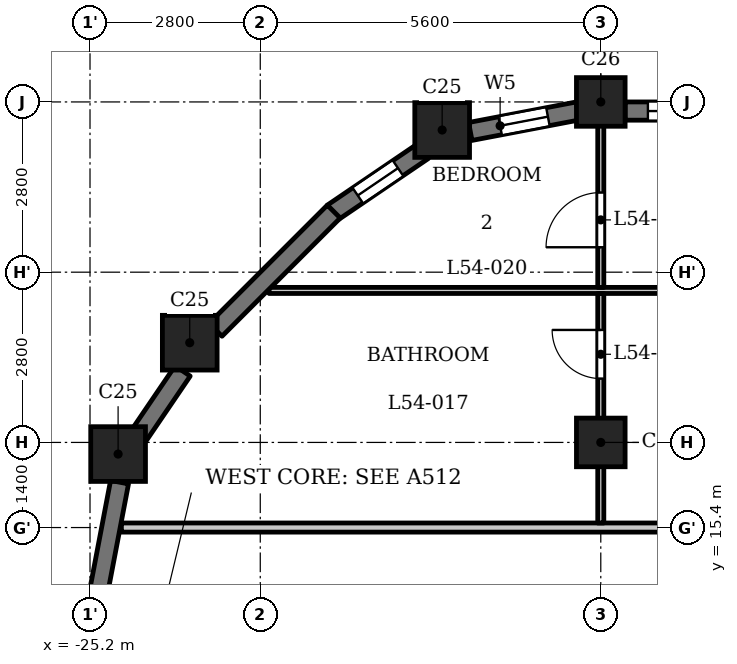
"""IFC4 building model, lengths in metres.
Left out: names, types, materials, properties, quantities, classifications, styles, units other than length and angle.
Written with IfcOpenShell. Run it as: python <this file> out.ifc"""

import sys

from ifc_helpers import new_model, si_unit, direction, frame, frame_2d, origin, origin_2d, place, context, subcontext, project, spatial, rectangle, extrude, element, fill, save


model = new_model("IFC4")
c1 = context("Model", 3, precision=1e-05, world=origin(), true_north=direction((0.0, 1.0)))
c2 = subcontext(c1, "Body", "Model", "MODEL_VIEW")
j1 = project(units=[si_unit("LENGTHUNIT", "METRE"), si_unit("PLANEANGLEUNIT", "RADIAN")], contexts=[c1])
p1 = place(None, origin())
s1 = spatial("IfcSite", under=j1, at=p1, CompositionType="ELEMENT")
p2 = place(p1, origin())
s2 = spatial("IfcBuilding", under=s1, at=p2, CompositionType="ELEMENT")
p3 = place(p2, frame((0.0, 0.0, 209.9)))
s3 = spatial("IfcBuildingStorey", under=s2, at=p3, CompositionType="ELEMENT", Elevation=209.9)
for number, where, z_axis, x_axis in (
    (1, (-19.409, 21.938, 0.0), (0.0, 0.0, 1.0), (1.0, 0.0, 0.0)),
    (2, (-23.56, 18.44, 0.0), (0.0, 0.0, 1.0), (1.0, 0.0, 0.0)),
    (3, (-24.738, 16.609, 0.0), (0.0, 0.0, 1.0), (1.0, 0.0, 0.0)),
):
    element("IfcColumn", number, at=place(p3, frame(where, z_axis=z_axis, x_axis=x_axis)), inside=s3, PredefinedType="COLUMN", context=c2, shape_type="SweptSolid", body=[
        extrude(rectangle(XDim=0.9, YDim=0.9, at=origin_2d()), origin(), (0.0, 0.0, 1.0), 3.5),
    ])
for number, where, z_axis, x_axis in (
    (4, (-16.8, 16.8, 0.0), (0.0, 0.0, 1.0), (1.0, 0.0, 0.0)),
    (5, (-16.8, 22.4, 0.0), (0.0, 0.0, 1.0), (1.0, 0.0, 0.0)),
):
    element("IfcColumn", number, at=place(p3, frame(where, z_axis=z_axis, x_axis=x_axis)), inside=s3, PredefinedType="COLUMN", context=c2, shape_type="SweptSolid", body=[
        extrude(rectangle(XDim=0.8, YDim=0.8, at=origin_2d()), origin(), (0.0, 0.0, 1.0), 3.5),
    ])
p4 = place(p3, frame((-14.45, 22.25, 0.0), z_axis=(0.0, 0.0, 1.0), x_axis=(-1.0, 0.0, 0.0)))
e6 = element("IfcWall", 6, at=p4, inside=s3, PredefinedType="SOLIDWALL", context=c2, shape_type="SweptSolid", body=[
    extrude(rectangle(XDim=1.95, YDim=0.3, at=frame_2d((0.975, 0.0))), origin(), (0.0, 0.0, 1.0), 2.5),
])
p5 = place(p4, frame((0.375, 0.0, 0.6)))
e7 = element("IfcOpeningElement", 7, at=p5, cuts=e6, PredefinedType="OPENING", context=c2, shape_type="SweptSolid", body=[
    extrude(rectangle(XDim=1.2, YDim=1.55, at=frame_2d((0.6, 0.775))), frame((0.0, 0.16, 0.0), z_axis=(0.0, -1.0, 0.0), x_axis=(1.0, 0.0, 0.0)), (0.0, 0.0, 1.0), 0.32),
])
p6 = place(p3, frame((-17.179, 22.251, 0.0), z_axis=(0.0, 0.0, 1.0), x_axis=(-0.98230529033, -0.187286722942, 0.0)))
e8 = element("IfcWall", 8, at=p6, inside=s3, PredefinedType="SOLIDWALL", context=c2, shape_type="SweptSolid", body=[
    extrude(rectangle(XDim=1.799, YDim=0.3, at=frame_2d((0.899, 0.0))), origin(), (0.0, 0.0, 1.0), 2.5),
])
p7 = place(p6, frame((0.5, 0.0, 0.6)))
e9 = element("IfcOpeningElement", 9, at=p7, cuts=e8, PredefinedType="OPENING", context=c2, shape_type="SweptSolid", body=[
    extrude(rectangle(XDim=0.8, YDim=1.55, at=frame_2d((0.4, 0.775))), frame((0.0, 0.16, 0.0), z_axis=(0.0, -1.0, 0.0), x_axis=(1.0, 0.0, 0.0)), (0.0, 0.0, 1.0), 0.32),
])
p8 = place(p3, frame((-19.719, 21.594, 0.0), z_axis=(0.0, 0.0, 1.0), x_axis=(-0.827067282455, -0.562102935673, 0.0)))
e10 = element("IfcWall", 10, at=p8, inside=s3, PredefinedType="SOLIDWALL", context=c2, shape_type="SweptSolid", body=[
    extrude(rectangle(XDim=1.806, YDim=0.3, at=frame_2d((0.903, 0.0))), origin(), (0.0, 0.0, 1.0), 2.5),
])
p9 = place(p8, frame((0.503, 0.0, 0.6)))
e11 = element("IfcOpeningElement", 11, at=p9, cuts=e10, PredefinedType="OPENING", context=c2, shape_type="SweptSolid", body=[
    extrude(rectangle(XDim=0.8, YDim=1.55, at=frame_2d((0.4, 0.775))), frame((0.0, 0.16, 0.0), z_axis=(0.0, -1.0, 0.0), x_axis=(1.0, 0.0, 0.0)), (0.0, 0.0, 1.0), 0.32),
])
p10 = place(p3, frame((-21.191, 20.597, 0.0), z_axis=(0.0, 0.0, 1.0), x_axis=(-0.707106781187, -0.707106781187, 0.0)))
e12 = element("IfcWall", 12, at=p10, inside=s3, PredefinedType="SOLIDWALL", context=c2, shape_type="SweptSolid", body=[
    extrude(rectangle(XDim=2.75, YDim=0.3, at=frame_2d((1.375, 0.0))), origin(), (0.0, 0.0, 1.0), 2.5),
])
p11 = place(p3, frame((-23.676, 17.975, 0.0), z_axis=(0.0, 0.0, 1.0), x_axis=(-0.56200149592, -0.827136215253, 0.0)))
e13 = element("IfcWall", 13, at=p11, inside=s3, PredefinedType="SOLIDWALL", context=c2, shape_type="SweptSolid", body=[
    extrude(rectangle(XDim=1.277, YDim=0.3, at=frame_2d((0.639, 0.0))), origin(), (0.0, 0.0, 1.0), 2.5),
])
p12 = place(p3, frame((-24.714, 16.146, 0.0), z_axis=(0.0, 0.0, 1.0), x_axis=(-0.187348135549, -0.982293579388, 0.0)))
e14 = element("IfcWall", 14, at=p12, inside=s3, PredefinedType="SOLIDWALL", context=c2, shape_type="SweptSolid", body=[
    extrude(rectangle(XDim=1.806, YDim=0.3, at=frame_2d((0.903, 0.0))), origin(), (0.0, 0.0, 1.0), 2.5),
])
p13 = place(p3, frame((-24.684, 15.4, 0.0), z_axis=(0.0, 0.0, 1.0), x_axis=(1.0, 0.0, 0.0)))
e15 = element("IfcWall", 15, at=p13, inside=s3, PredefinedType="PARTITIONING", context=c2, shape_type="SweptSolid", body=[
    extrude(rectangle(XDim=49.368, YDim=0.15, at=frame_2d((24.684, 0.0))), origin(), (0.0, 0.0, 1.0), 3.2),
])
p14 = place(p13, frame((17.434, 0.0, 0.0)))
e16 = element("IfcOpeningElement", 16, at=p14, cuts=e15, PredefinedType="OPENING", context=c2, shape_type="SweptSolid", body=[
    extrude(rectangle(XDim=1.0, YDim=2.1, at=frame_2d((0.5, 1.05))), frame((0.0, 0.085, 0.0), z_axis=(0.0, -1.0, 0.0), x_axis=(1.0, 0.0, 0.0)), (0.0, 0.0, 1.0), 0.17),
])
p15 = place(p13, frame((28.634, 0.0, 0.0)))
e17 = element("IfcOpeningElement", 17, at=p15, cuts=e15, PredefinedType="OPENING", context=c2, shape_type="SweptSolid", body=[
    extrude(rectangle(XDim=1.0, YDim=2.1, at=frame_2d((0.5, 1.05))), frame((0.0, 0.085, 0.0), z_axis=(0.0, -1.0, 0.0), x_axis=(1.0, 0.0, 0.0)), (0.0, 0.0, 1.0), 0.17),
])
p16 = place(p13, frame((47.225, 0.0, 0.0)))
e18 = element("IfcOpeningElement", 18, at=p16, cuts=e15, PredefinedType="OPENING", context=c2, shape_type="SweptSolid", body=[
    extrude(rectangle(XDim=1.0, YDim=2.1, at=frame_2d((0.5, 1.05))), frame((0.0, 0.085, 0.0), z_axis=(0.0, -1.0, 0.0), x_axis=(1.0, 0.0, 0.0)), (0.0, 0.0, 1.0), 0.17),
])
p17 = place(p3, frame((-22.256, 19.3, 0.0), z_axis=(0.0, 0.0, 1.0), x_axis=(1.0, 0.0, 0.0)))
e19 = element("IfcWall", 19, at=p17, inside=s3, PredefinedType="PARTITIONING", context=c2, shape_type="SweptSolid", body=[
    extrude(rectangle(XDim=44.511, YDim=0.1, at=frame_2d((22.256, 0.0))), origin(), (0.0, 0.0, 1.0), 3.2),
])
p18 = place(p17, frame((11.606, 0.0, 0.0)))
e20 = element("IfcOpeningElement", 20, at=p18, cuts=e19, PredefinedType="OPENING", context=c2, shape_type="SweptSolid", body=[
    extrude(rectangle(XDim=0.9, YDim=2.1, at=frame_2d((0.45, 1.05))), frame((0.0, 0.06, 0.0), z_axis=(0.0, -1.0, 0.0), x_axis=(1.0, 0.0, 0.0)), (0.0, 0.0, 1.0), 0.12),
])
p19 = place(p17, frame((9.506, 0.0, 0.0)))
e21 = element("IfcOpeningElement", 21, at=p19, cuts=e19, PredefinedType="OPENING", context=c2, shape_type="SweptSolid", body=[
    extrude(rectangle(XDim=0.9, YDim=2.1, at=frame_2d((0.45, 1.05))), frame((0.0, 0.06, 0.0), z_axis=(0.0, -1.0, 0.0), x_axis=(1.0, 0.0, 0.0)), (0.0, 0.0, 1.0), 0.12),
])
p20 = place(p17, frame((20.806, 0.0, 0.0)))
e22 = element("IfcOpeningElement", 22, at=p20, cuts=e19, PredefinedType="OPENING", context=c2, shape_type="SweptSolid", body=[
    extrude(rectangle(XDim=0.8, YDim=2.1, at=frame_2d((0.4, 1.05))), frame((0.0, 0.06, 0.0), z_axis=(0.0, -1.0, 0.0), x_axis=(1.0, 0.0, 0.0)), (0.0, 0.0, 1.0), 0.12),
])
p21 = place(p17, frame((26.306, 0.0, 0.0)))
e23 = element("IfcOpeningElement", 23, at=p21, cuts=e19, PredefinedType="OPENING", context=c2, shape_type="SweptSolid", body=[
    extrude(rectangle(XDim=0.9, YDim=2.1, at=frame_2d((0.45, 1.05))), frame((0.0, 0.06, 0.0), z_axis=(0.0, -1.0, 0.0), x_axis=(1.0, 0.0, 0.0)), (0.0, 0.0, 1.0), 0.12),
])
p22 = place(p17, frame((40.278, 0.0, 0.0)))
e24 = element("IfcOpeningElement", 24, at=p22, cuts=e19, PredefinedType="OPENING", context=c2, shape_type="SweptSolid", body=[
    extrude(rectangle(XDim=0.9, YDim=2.1, at=frame_2d((0.45, 1.05))), frame((0.0, 0.06, 0.0), z_axis=(0.0, -1.0, 0.0), x_axis=(1.0, 0.0, 0.0)), (0.0, 0.0, 1.0), 0.12),
])
p23 = place(p17, frame((36.756, 0.0, 0.0)))
e25 = element("IfcOpeningElement", 25, at=p23, cuts=e19, PredefinedType="OPENING", context=c2, shape_type="SweptSolid", body=[
    extrude(rectangle(XDim=0.9, YDim=2.1, at=frame_2d((0.45, 1.05))), frame((0.0, 0.06, 0.0), z_axis=(0.0, -1.0, 0.0), x_axis=(1.0, 0.0, 0.0)), (0.0, 0.0, 1.0), 0.12),
])
p24 = place(p3, frame((-16.8, 15.475, 0.0), z_axis=(0.0, 0.0, 1.0), x_axis=(0.0, 1.0, 0.0)))
e26 = element("IfcWall", 26, at=p24, inside=s3, PredefinedType="PARTITIONING", context=c2, shape_type="SweptSolid", body=[
    extrude(rectangle(XDim=3.775, YDim=0.1, at=frame_2d((1.887, 0.0))), origin(), (0.0, 0.0, 1.0), 2.55),
])
p25 = place(p24, frame((2.375, 0.0, 0.0)))
e27 = element("IfcOpeningElement", 27, at=p25, cuts=e26, PredefinedType="OPENING", context=c2, shape_type="SweptSolid", body=[
    extrude(rectangle(XDim=0.8, YDim=2.1, at=frame_2d((0.4, 1.05))), frame((0.0, 0.06, 0.0), z_axis=(0.0, -1.0, 0.0), x_axis=(1.0, 0.0, 0.0)), (0.0, 0.0, 1.0), 0.12),
])
p26 = place(p3, frame((-16.8, 19.35, 0.0), z_axis=(0.0, 0.0, 1.0), x_axis=(0.0, 1.0, 0.0)))
e28 = element("IfcWall", 28, at=p26, inside=s3, PredefinedType="PARTITIONING", context=c2, shape_type="SweptSolid", body=[
    extrude(rectangle(XDim=2.96, YDim=0.1, at=frame_2d((1.48, 0.0))), origin(), (0.0, 0.0, 1.0), 2.55),
])
p27 = place(p26, frame((0.66, 0.0, 0.0)))
e29 = element("IfcOpeningElement", 29, at=p27, cuts=e28, PredefinedType="OPENING", context=c2, shape_type="SweptSolid", body=[
    extrude(rectangle(XDim=0.9, YDim=2.1, at=frame_2d((0.45, 1.05))), frame((0.0, 0.06, 0.0), z_axis=(0.0, -1.0, 0.0), x_axis=(1.0, 0.0, 0.0)), (0.0, 0.0, 1.0), 0.12),
])
p28 = place(p25, origin())
e30 = element("IfcDoor", 30, at=p28, inside=s3, OperationType="SINGLE_SWING_LEFT", PredefinedType="DOOR", context=c2, shape_type="SweptSolid", body=[
    extrude(rectangle(XDim=0.8, YDim=2.1, at=frame_2d((0.4, 1.05))), frame((0.0, 0.025, 0.0), z_axis=(0.0, -1.0, 0.0), x_axis=(1.0, 0.0, 0.0)), (0.0, 0.0, 1.0), 0.05),
])
fill(e27, e30)
p29 = place(p27, origin())
e31 = element("IfcDoor", 31, at=p29, inside=s3, OperationType="SINGLE_SWING_RIGHT", PredefinedType="DOOR", context=c2, shape_type="SweptSolid", body=[
    extrude(rectangle(XDim=0.9, YDim=2.1, at=frame_2d((0.45, 1.05))), frame((0.0, 0.025, 0.0), z_axis=(0.0, -1.0, 0.0), x_axis=(1.0, 0.0, 0.0)), (0.0, 0.0, 1.0), 0.05),
])
fill(e29, e31)
p30 = place(p5, origin())
e32 = element("IfcWindow", 32, at=p30, inside=s3, PartitioningType="SINGLE_PANEL", PredefinedType="WINDOW", context=c2, shape_type="SweptSolid", body=[
    extrude(rectangle(XDim=1.2, YDim=1.55, at=frame_2d((0.6, 0.775))), frame((0.0, 0.03, 0.0), z_axis=(0.0, -1.0, 0.0), x_axis=(1.0, 0.0, 0.0)), (0.0, 0.0, 1.0), 0.06),
])
fill(e7, e32)
p31 = place(p7, origin())
e33 = element("IfcWindow", 33, at=p31, inside=s3, PartitioningType="SINGLE_PANEL", PredefinedType="WINDOW", context=c2, shape_type="SweptSolid", body=[
    extrude(rectangle(XDim=0.8, YDim=1.55, at=frame_2d((0.4, 0.775))), frame((0.0, 0.03, 0.0), z_axis=(0.0, -1.0, 0.0), x_axis=(1.0, 0.0, 0.0)), (0.0, 0.0, 1.0), 0.06),
])
fill(e9, e33)
p32 = place(p9, origin())
e34 = element("IfcWindow", 34, at=p32, inside=s3, PartitioningType="SINGLE_PANEL", PredefinedType="WINDOW", context=c2, shape_type="SweptSolid", body=[
    extrude(rectangle(XDim=0.8, YDim=1.55, at=frame_2d((0.4, 0.775))), frame((0.0, 0.03, 0.0), z_axis=(0.0, -1.0, 0.0), x_axis=(1.0, 0.0, 0.0)), (0.0, 0.0, 1.0), 0.06),
])
fill(e11, e34)
save(model, sys.argv[1])
